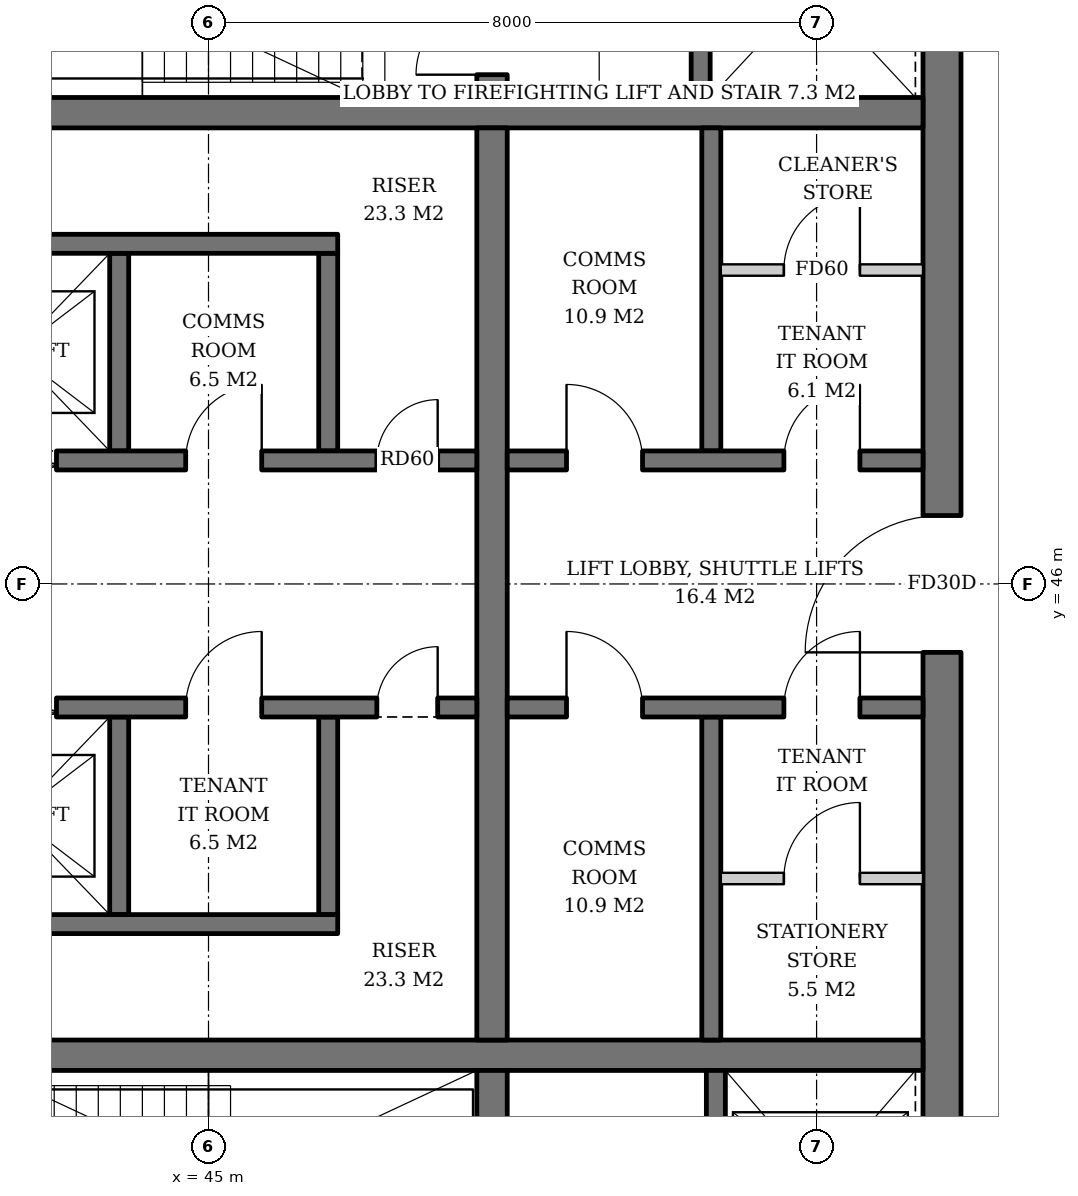
"""IFC4 building model, lengths in metres.
Left out: names, types, materials, properties, quantities, classifications, styles, units other than length and angle.
Written with IfcOpenShell. Run it as: python <this file> out.ifc"""

import sys

from ifc_helpers import new_model, si_unit, direction, frame, frame_2d, origin, place, context, subcontext, project, spatial, rectangle, extrude, element, fill, save


model = new_model("IFC4")
c1 = context("Model", 3, precision=1e-05, world=origin(), true_north=direction((0.0, 1.0)))
c2 = subcontext(c1, "Body", "Model", "MODEL_VIEW")
j1 = project(units=[si_unit("LENGTHUNIT", "METRE"), si_unit("PLANEANGLEUNIT", "RADIAN")], contexts=[c1])
p1 = place(None, origin())
s1 = spatial("IfcSite", under=j1, at=p1, CompositionType="ELEMENT")
p2 = place(p1, origin())
s2 = spatial("IfcBuilding", under=s1, at=p2, CompositionType="ELEMENT")
p3 = place(p2, frame((0.0, 0.0, 260.4)))
s3 = spatial("IfcBuildingStorey", under=s2, at=p3, CompositionType="ELEMENT", Elevation=260.4)
p4 = place(p3, frame((54.65, 36.6, 0.0), z_axis=(0.0, 0.0, 1.0), x_axis=(0.0, 1.0, 0.0)))
e1 = element("IfcWall", 1, at=p4, inside=s3, PredefinedType="SHEAR", context=c2, shape_type="SweptSolid", body=[
    extrude(rectangle(XDim=18.8, YDim=0.5, at=frame_2d((9.4, 0.0))), origin(), (0.0, 0.0, 1.0), 3.8),
])
p5 = place(p4, frame((8.5, 0.0, 0.0)))
e2 = element("IfcOpeningElement", 2, at=p5, cuts=e1, PredefinedType="OPENING", context=c2, shape_type="SweptSolid", body=[
    extrude(rectangle(XDim=1.8, YDim=2.4, at=frame_2d((0.9, 1.2))), frame((0.0, 0.26, 0.0), z_axis=(0.0, -1.0, 0.0), x_axis=(1.0, 0.0, 0.0)), (0.0, 0.0, 1.0), 0.52),
])
for number, where, z_axis, x_axis in (
    (3, (35.6, 39.8, 0.0), (0.0, 0.0, 1.0), (1.0, 0.0, 0.0)),
    (4, (35.6, 52.2, 0.0), (0.0, 0.0, 1.0), (1.0, 0.0, 0.0)),
):
    element("IfcWall", number, at=place(p3, frame(where, z_axis=z_axis, x_axis=x_axis)), inside=s3, PredefinedType="SHEAR", context=c2, shape_type="SweptSolid", body=[
        extrude(rectangle(XDim=18.8, YDim=0.4, at=frame_2d((9.4, 0.0))), origin(), (0.0, 0.0, 1.0), 3.8),
    ])
p6 = place(p3, frame((48.73, 36.6, 0.0), z_axis=(0.0, 0.0, 1.0), x_axis=(0.0, 1.0, 0.0)))
e5 = element("IfcWall", 5, at=p6, inside=s3, PredefinedType="SHEAR", context=c2, shape_type="SweptSolid", body=[
    extrude(rectangle(XDim=3.0, YDim=0.4, at=frame_2d((1.5, 0.0))), origin(), (0.0, 0.0, 1.0), 3.8),
])
p7 = place(p3, frame((48.73, 40.0, 0.0), z_axis=(0.0, 0.0, 1.0), x_axis=(0.0, 1.0, 0.0)))
e6 = element("IfcWall", 6, at=p7, inside=s3, PredefinedType="SHEAR", context=c2, shape_type="SweptSolid", body=[
    extrude(rectangle(XDim=12.0, YDim=0.4, at=frame_2d((6.0, 0.0))), origin(), (0.0, 0.0, 1.0), 3.8),
])
p8 = place(p3, frame((48.73, 52.4, 0.0), z_axis=(0.0, 0.0, 1.0), x_axis=(0.0, 1.0, 0.0)))
e7 = element("IfcWall", 7, at=p8, inside=s3, PredefinedType="SHEAR", context=c2, shape_type="SweptSolid", body=[
    extrude(rectangle(XDim=3.0, YDim=0.4, at=frame_2d((1.5, 0.0))), origin(), (0.0, 0.0, 1.0), 3.8),
])
p9 = place(p8, frame((0.3, 0.0, 0.0)))
e8 = element("IfcOpeningElement", 8, at=p9, cuts=e7, PredefinedType="OPENING", context=c2, shape_type="SweptSolid", body=[
    extrude(rectangle(XDim=1.0, YDim=2.1, at=frame_2d((0.5, 1.05))), frame((0.0, 0.21, 0.0), z_axis=(0.0, -1.0, 0.0), x_axis=(1.0, 0.0, 0.0)), (0.0, 0.0, 1.0), 0.42),
])
p10 = place(p3, frame((51.675, 36.6, 0.0), z_axis=(0.0, 0.0, 1.0), x_axis=(0.0, 1.0, 0.0)))
e9 = element("IfcWall", 9, at=p10, inside=s3, PredefinedType="SHEAR", context=c2, shape_type="SweptSolid", body=[
    extrude(rectangle(XDim=3.0, YDim=0.25, at=frame_2d((1.5, 0.0))), origin(), (0.0, 0.0, 1.0), 3.8),
])
p11 = place(p10, frame((0.85, 0.0, 0.0)))
e10 = element("IfcOpeningElement", 10, at=p11, cuts=e9, PredefinedType="OPENING", context=c2, shape_type="SweptSolid", body=[
    extrude(rectangle(XDim=1.4, YDim=2.4, at=frame_2d((0.7, 1.2))), frame((0.0, 0.135, 0.0), z_axis=(0.0, -1.0, 0.0), x_axis=(1.0, 0.0, 0.0)), (0.0, 0.0, 1.0), 0.27),
])
p12 = place(p3, frame((51.475, 52.4, 0.0), z_axis=(0.0, 0.0, 1.0), x_axis=(0.0, 1.0, 0.0)))
e11 = element("IfcWall", 11, at=p12, inside=s3, PredefinedType="SHEAR", context=c2, shape_type="SweptSolid", body=[
    extrude(rectangle(XDim=3.0, YDim=0.25, at=frame_2d((1.5, 0.0))), origin(), (0.0, 0.0, 1.0), 3.8),
])
p13 = place(p12, frame((0.8, 0.0, 0.0)))
e12 = element("IfcOpeningElement", 12, at=p13, cuts=e11, PredefinedType="OPENING", context=c2, shape_type="SweptSolid", body=[
    extrude(rectangle(XDim=1.3, YDim=2.2, at=frame_2d((0.65, 1.1))), frame((0.0, 0.135, 0.0), z_axis=(0.0, -1.0, 0.0), x_axis=(1.0, 0.0, 0.0)), (0.0, 0.0, 1.0), 0.27),
])
for number, where, z_axis, x_axis in (
    (13, (43.825, 47.75, 0.0), (0.0, 0.0, 1.0), (0.0, 1.0, 0.0)),
    (14, (46.575, 47.75, 0.0), (0.0, 0.0, 1.0), (0.0, 1.0, 0.0)),
):
    element("IfcWall", number, at=place(p3, frame(where, z_axis=z_axis, x_axis=x_axis)), inside=s3, PredefinedType="SHEAR", context=c2, shape_type="SweptSolid", body=[
        extrude(rectangle(XDim=2.6, YDim=0.25, at=frame_2d((1.3, 0.0))), origin(), (0.0, 0.0, 1.0), 3.8),
    ])
p14 = place(p3, frame((35.6, 50.475, 0.0), z_axis=(0.0, 0.0, 1.0), x_axis=(1.0, 0.0, 0.0)))
e15 = element("IfcWall", 15, at=p14, inside=s3, PredefinedType="SHEAR", context=c2, shape_type="SweptSolid", body=[
    extrude(rectangle(XDim=11.1, YDim=0.25, at=frame_2d((5.55, 0.0))), origin(), (0.0, 0.0, 1.0), 3.8),
])
p15 = place(p3, frame((35.6, 47.625, 0.0), z_axis=(0.0, 0.0, 1.0), x_axis=(1.0, 0.0, 0.0)))
e16 = element("IfcWall", 16, at=p15, inside=s3, PredefinedType="SHEAR", context=c2, shape_type="SweptSolid", body=[
    extrude(rectangle(XDim=12.93, YDim=0.25, at=frame_2d((6.465, 0.0))), origin(), (0.0, 0.0, 1.0), 3.8),
])
p16 = place(p15, frame((0.75, 0.0, 0.0)))
e17 = element("IfcOpeningElement", 17, at=p16, cuts=e16, PredefinedType="OPENING", context=c2, shape_type="SweptSolid", body=[
    extrude(rectangle(XDim=1.1, YDim=2.2, at=frame_2d((0.55, 1.1))), frame((0.0, 0.135, 0.0), z_axis=(0.0, -1.0, 0.0), x_axis=(1.0, 0.0, 0.0)), (0.0, 0.0, 1.0), 0.27),
])
p17 = place(p15, frame((3.55, 0.0, 0.0)))
e18 = element("IfcOpeningElement", 18, at=p17, cuts=e16, PredefinedType="OPENING", context=c2, shape_type="SweptSolid", body=[
    extrude(rectangle(XDim=1.1, YDim=2.2, at=frame_2d((0.55, 1.1))), frame((0.0, 0.135, 0.0), z_axis=(0.0, -1.0, 0.0), x_axis=(1.0, 0.0, 0.0)), (0.0, 0.0, 1.0), 0.27),
])
p18 = place(p15, frame((6.3, 0.0, 0.0)))
e19 = element("IfcOpeningElement", 19, at=p18, cuts=e16, PredefinedType="OPENING", context=c2, shape_type="SweptSolid", body=[
    extrude(rectangle(XDim=1.1, YDim=2.2, at=frame_2d((0.55, 1.1))), frame((0.0, 0.135, 0.0), z_axis=(0.0, -1.0, 0.0), x_axis=(1.0, 0.0, 0.0)), (0.0, 0.0, 1.0), 0.27),
])
p19 = place(p15, frame((9.1, 0.0, 0.0)))
e20 = element("IfcOpeningElement", 20, at=p19, cuts=e16, PredefinedType="OPENING", context=c2, shape_type="SweptSolid", body=[
    extrude(rectangle(XDim=1.0, YDim=2.1, at=frame_2d((0.5, 1.05))), frame((0.0, 0.135, 0.0), z_axis=(0.0, -1.0, 0.0), x_axis=(1.0, 0.0, 0.0)), (0.0, 0.0, 1.0), 0.27),
])
p20 = place(p15, frame((11.615, 0.0, 0.0)))
e21 = element("IfcOpeningElement", 21, at=p20, cuts=e16, PredefinedType="OPENING", context=c2, shape_type="SweptSolid", body=[
    extrude(rectangle(XDim=0.8, YDim=2.0, at=frame_2d((0.4, 1.0))), frame((0.0, 0.135, 0.0), z_axis=(0.0, -1.0, 0.0), x_axis=(1.0, 0.0, 0.0)), (0.0, 0.0, 1.0), 0.27),
])
for number, where, z_axis, x_axis in (
    (22, (43.825, 44.25, 0.0), (0.0, 0.0, 1.0), (0.0, -1.0, 0.0)),
    (23, (46.575, 44.25, 0.0), (0.0, 0.0, 1.0), (0.0, -1.0, 0.0)),
):
    element("IfcWall", number, at=place(p3, frame(where, z_axis=z_axis, x_axis=x_axis)), inside=s3, PredefinedType="SHEAR", context=c2, shape_type="SweptSolid", body=[
        extrude(rectangle(XDim=2.6, YDim=0.25, at=frame_2d((1.3, 0.0))), origin(), (0.0, 0.0, 1.0), 3.8),
    ])
p21 = place(p3, frame((35.6, 41.525, 0.0), z_axis=(0.0, 0.0, 1.0), x_axis=(1.0, 0.0, 0.0)))
e24 = element("IfcWall", 24, at=p21, inside=s3, PredefinedType="SHEAR", context=c2, shape_type="SweptSolid", body=[
    extrude(rectangle(XDim=11.1, YDim=0.25, at=frame_2d((5.55, 0.0))), origin(), (0.0, 0.0, 1.0), 3.8),
])
p22 = place(p3, frame((35.6, 44.375, 0.0), z_axis=(0.0, 0.0, 1.0), x_axis=(1.0, 0.0, 0.0)))
e25 = element("IfcWall", 25, at=p22, inside=s3, PredefinedType="SHEAR", context=c2, shape_type="SweptSolid", body=[
    extrude(rectangle(XDim=12.93, YDim=0.25, at=frame_2d((6.465, 0.0))), origin(), (0.0, 0.0, 1.0), 3.8),
])
p23 = place(p22, frame((0.75, 0.0, 0.0)))
e26 = element("IfcOpeningElement", 26, at=p23, cuts=e25, PredefinedType="OPENING", context=c2, shape_type="SweptSolid", body=[
    extrude(rectangle(XDim=1.1, YDim=2.2, at=frame_2d((0.55, 1.1))), frame((0.0, 0.135, 0.0), z_axis=(0.0, -1.0, 0.0), x_axis=(1.0, 0.0, 0.0)), (0.0, 0.0, 1.0), 0.27),
])
p24 = place(p22, frame((3.55, 0.0, 0.0)))
e27 = element("IfcOpeningElement", 27, at=p24, cuts=e25, PredefinedType="OPENING", context=c2, shape_type="SweptSolid", body=[
    extrude(rectangle(XDim=1.1, YDim=2.2, at=frame_2d((0.55, 1.1))), frame((0.0, 0.135, 0.0), z_axis=(0.0, -1.0, 0.0), x_axis=(1.0, 0.0, 0.0)), (0.0, 0.0, 1.0), 0.27),
])
p25 = place(p22, frame((6.3, 0.0, 0.0)))
e28 = element("IfcOpeningElement", 28, at=p25, cuts=e25, PredefinedType="OPENING", context=c2, shape_type="SweptSolid", body=[
    extrude(rectangle(XDim=1.1, YDim=2.2, at=frame_2d((0.55, 1.1))), frame((0.0, 0.135, 0.0), z_axis=(0.0, -1.0, 0.0), x_axis=(1.0, 0.0, 0.0)), (0.0, 0.0, 1.0), 0.27),
])
p26 = place(p22, frame((9.1, 0.0, 0.0)))
e29 = element("IfcOpeningElement", 29, at=p26, cuts=e25, PredefinedType="OPENING", context=c2, shape_type="SweptSolid", body=[
    extrude(rectangle(XDim=1.0, YDim=2.1, at=frame_2d((0.5, 1.05))), frame((0.0, 0.135, 0.0), z_axis=(0.0, -1.0, 0.0), x_axis=(1.0, 0.0, 0.0)), (0.0, 0.0, 1.0), 0.27),
])
p27 = place(p22, frame((11.615, 0.0, 0.0)))
e30 = element("IfcOpeningElement", 30, at=p27, cuts=e25, PredefinedType="OPENING", context=c2, shape_type="SweptSolid", body=[
    extrude(rectangle(XDim=0.8, YDim=2.0, at=frame_2d((0.4, 1.0))), frame((0.0, 0.135, 0.0), z_axis=(0.0, -1.0, 0.0), x_axis=(1.0, 0.0, 0.0)), (0.0, 0.0, 1.0), 0.27),
])
p28 = place(p3, frame((51.615, 47.75, 0.0), z_axis=(0.0, 0.0, 1.0), x_axis=(0.0, 1.0, 0.0)))
e31 = element("IfcWall", 31, at=p28, inside=s3, PredefinedType="SHEAR", context=c2, shape_type="SweptSolid", body=[
    extrude(rectangle(XDim=4.25, YDim=0.25, at=frame_2d((2.125, 0.0))), origin(), (0.0, 0.0, 1.0), 3.8),
])
p29 = place(p3, frame((48.93, 47.625, 0.0), z_axis=(0.0, 0.0, 1.0), x_axis=(1.0, 0.0, 0.0)))
e32 = element("IfcWall", 32, at=p29, inside=s3, PredefinedType="SHEAR", context=c2, shape_type="SweptSolid", body=[
    extrude(rectangle(XDim=5.47, YDim=0.25, at=frame_2d((2.735, 0.0))), origin(), (0.0, 0.0, 1.0), 3.8),
])
p30 = place(p29, frame((0.78, 0.0, 0.0)))
e33 = element("IfcOpeningElement", 33, at=p30, cuts=e32, PredefinedType="OPENING", context=c2, shape_type="SweptSolid", body=[
    extrude(rectangle(XDim=1.0, YDim=2.1, at=frame_2d((0.5, 1.05))), frame((0.0, 0.135, 0.0), z_axis=(0.0, -1.0, 0.0), x_axis=(1.0, 0.0, 0.0)), (0.0, 0.0, 1.0), 0.27),
])
p31 = place(p29, frame((3.64, 0.0, 0.0)))
e34 = element("IfcOpeningElement", 34, at=p31, cuts=e32, PredefinedType="OPENING", context=c2, shape_type="SweptSolid", body=[
    extrude(rectangle(XDim=1.0, YDim=2.1, at=frame_2d((0.5, 1.05))), frame((0.0, 0.135, 0.0), z_axis=(0.0, -1.0, 0.0), x_axis=(1.0, 0.0, 0.0)), (0.0, 0.0, 1.0), 0.27),
])
p32 = place(p3, frame((51.615, 44.25, 0.0), z_axis=(0.0, 0.0, 1.0), x_axis=(0.0, -1.0, 0.0)))
e35 = element("IfcWall", 35, at=p32, inside=s3, PredefinedType="SHEAR", context=c2, shape_type="SweptSolid", body=[
    extrude(rectangle(XDim=4.25, YDim=0.25, at=frame_2d((2.125, 0.0))), origin(), (0.0, 0.0, 1.0), 3.8),
])
p33 = place(p3, frame((48.93, 44.375, 0.0), z_axis=(0.0, 0.0, 1.0), x_axis=(1.0, 0.0, 0.0)))
e36 = element("IfcWall", 36, at=p33, inside=s3, PredefinedType="SHEAR", context=c2, shape_type="SweptSolid", body=[
    extrude(rectangle(XDim=5.47, YDim=0.25, at=frame_2d((2.735, 0.0))), origin(), (0.0, 0.0, 1.0), 3.8),
])
p34 = place(p33, frame((0.78, 0.0, 0.0)))
e37 = element("IfcOpeningElement", 37, at=p34, cuts=e36, PredefinedType="OPENING", context=c2, shape_type="SweptSolid", body=[
    extrude(rectangle(XDim=1.0, YDim=2.1, at=frame_2d((0.5, 1.05))), frame((0.0, 0.135, 0.0), z_axis=(0.0, -1.0, 0.0), x_axis=(1.0, 0.0, 0.0)), (0.0, 0.0, 1.0), 0.27),
])
p35 = place(p33, frame((3.64, 0.0, 0.0)))
e38 = element("IfcOpeningElement", 38, at=p35, cuts=e36, PredefinedType="OPENING", context=c2, shape_type="SweptSolid", body=[
    extrude(rectangle(XDim=1.0, YDim=2.1, at=frame_2d((0.5, 1.05))), frame((0.0, 0.135, 0.0), z_axis=(0.0, -1.0, 0.0), x_axis=(1.0, 0.0, 0.0)), (0.0, 0.0, 1.0), 0.27),
])
p36 = place(p3, frame((51.74, 50.13, 0.0), z_axis=(0.0, 0.0, 1.0), x_axis=(1.0, 0.0, 0.0)))
e39 = element("IfcWall", 39, at=p36, inside=s3, PredefinedType="SOLIDWALL", context=c2, shape_type="SweptSolid", body=[
    extrude(rectangle(XDim=2.66, YDim=0.15, at=frame_2d((1.33, 0.0))), origin(), (0.0, 0.0, 1.0), 3.62),
])
p37 = place(p36, frame((0.83, 0.0, 0.0)))
e40 = element("IfcOpeningElement", 40, at=p37, cuts=e39, PredefinedType="OPENING", context=c2, shape_type="SweptSolid", body=[
    extrude(rectangle(XDim=1.0, YDim=2.1, at=frame_2d((0.5, 1.05))), frame((0.0, 0.085, 0.0), z_axis=(0.0, -1.0, 0.0), x_axis=(1.0, 0.0, 0.0)), (0.0, 0.0, 1.0), 0.17),
])
p38 = place(p3, frame((51.74, 42.125, 0.0), z_axis=(0.0, 0.0, 1.0), x_axis=(1.0, 0.0, 0.0)))
e41 = element("IfcWall", 41, at=p38, inside=s3, PredefinedType="SOLIDWALL", context=c2, shape_type="SweptSolid", body=[
    extrude(rectangle(XDim=2.66, YDim=0.15, at=frame_2d((1.33, 0.0))), origin(), (0.0, 0.0, 1.0), 3.62),
])
p39 = place(p38, frame((0.83, 0.0, 0.0)))
e42 = element("IfcOpeningElement", 42, at=p39, cuts=e41, PredefinedType="OPENING", context=c2, shape_type="SweptSolid", body=[
    extrude(rectangle(XDim=1.0, YDim=2.1, at=frame_2d((0.5, 1.05))), frame((0.0, 0.085, 0.0), z_axis=(0.0, -1.0, 0.0), x_axis=(1.0, 0.0, 0.0)), (0.0, 0.0, 1.0), 0.17),
])
p40 = place(p18, origin())
e43 = element("IfcDoor", 43, at=p40, inside=s3, OperationType="DOUBLE_DOOR_SLIDING", PredefinedType="DOOR", context=c2, shape_type="SweptSolid", body=[
    extrude(rectangle(XDim=1.1, YDim=2.2, at=frame_2d((0.55, 1.1))), frame((0.0, 0.025, 0.0), z_axis=(0.0, -1.0, 0.0), x_axis=(1.0, 0.0, 0.0)), (0.0, 0.0, 1.0), 0.05),
])
fill(e19, e43)
p41 = place(p19, origin())
e44 = element("IfcDoor", 44, at=p41, inside=s3, OperationType="SINGLE_SWING_RIGHT", PredefinedType="DOOR", context=c2, shape_type="SweptSolid", body=[
    extrude(rectangle(XDim=1.0, YDim=2.1, at=frame_2d((0.5, 1.05))), frame((0.0, 0.025, 0.0), z_axis=(0.0, -1.0, 0.0), x_axis=(1.0, 0.0, 0.0)), (0.0, 0.0, 1.0), 0.05),
])
fill(e20, e44)
p42 = place(p20, origin())
e45 = element("IfcDoor", 45, at=p42, inside=s3, OperationType="SINGLE_SWING_RIGHT", PredefinedType="DOOR", context=c2, shape_type="SweptSolid", body=[
    extrude(rectangle(XDim=0.8, YDim=2.0, at=frame_2d((0.4, 1.0))), frame((0.0, 0.025, 0.0), z_axis=(0.0, -1.0, 0.0), x_axis=(1.0, 0.0, 0.0)), (0.0, 0.0, 1.0), 0.05),
])
fill(e21, e45)
p43 = place(p25, origin())
e46 = element("IfcDoor", 46, at=p43, inside=s3, OperationType="DOUBLE_DOOR_SLIDING", PredefinedType="DOOR", context=c2, shape_type="SweptSolid", body=[
    extrude(rectangle(XDim=1.1, YDim=2.2, at=frame_2d((0.55, 1.1))), frame((0.0, 0.025, 0.0), z_axis=(0.0, -1.0, 0.0), x_axis=(1.0, 0.0, 0.0)), (0.0, 0.0, 1.0), 0.05),
])
fill(e28, e46)
p44 = place(p26, origin())
e47 = element("IfcDoor", 47, at=p44, inside=s3, OperationType="SINGLE_SWING_RIGHT", PredefinedType="DOOR", context=c2, shape_type="SweptSolid", body=[
    extrude(rectangle(XDim=1.0, YDim=2.1, at=frame_2d((0.5, 1.05))), frame((0.0, 0.025, 0.0), z_axis=(0.0, -1.0, 0.0), x_axis=(1.0, 0.0, 0.0)), (0.0, 0.0, 1.0), 0.05),
])
fill(e29, e47)
p45 = place(p27, origin())
e48 = element("IfcDoor", 48, at=p45, inside=s3, OperationType="SINGLE_SWING_RIGHT", PredefinedType="DOOR", context=c2, shape_type="SweptSolid", body=[
    extrude(rectangle(XDim=0.8, YDim=2.0, at=frame_2d((0.4, 1.0))), frame((0.0, 0.025, 0.0), z_axis=(0.0, -1.0, 0.0), x_axis=(1.0, 0.0, 0.0)), (0.0, 0.0, 1.0), 0.05),
])
fill(e30, e48)
p46 = place(p30, origin())
e49 = element("IfcDoor", 49, at=p46, inside=s3, OperationType="SINGLE_SWING_LEFT", PredefinedType="DOOR", context=c2, shape_type="SweptSolid", body=[
    extrude(rectangle(XDim=1.0, YDim=2.1, at=frame_2d((0.5, 1.05))), frame((0.0, 0.025, 0.0), z_axis=(0.0, -1.0, 0.0), x_axis=(1.0, 0.0, 0.0)), (0.0, 0.0, 1.0), 0.05),
])
fill(e33, e49)
p47 = place(p31, origin())
e50 = element("IfcDoor", 50, at=p47, inside=s3, OperationType="SINGLE_SWING_RIGHT", PredefinedType="DOOR", context=c2, shape_type="SweptSolid", body=[
    extrude(rectangle(XDim=1.0, YDim=2.1, at=frame_2d((0.5, 1.05))), frame((0.0, 0.025, 0.0), z_axis=(0.0, -1.0, 0.0), x_axis=(1.0, 0.0, 0.0)), (0.0, 0.0, 1.0), 0.05),
])
fill(e34, e50)
p48 = place(p34, origin())
e51 = element("IfcDoor", 51, at=p48, inside=s3, OperationType="SINGLE_SWING_LEFT", PredefinedType="DOOR", context=c2, shape_type="SweptSolid", body=[
    extrude(rectangle(XDim=1.0, YDim=2.1, at=frame_2d((0.5, 1.05))), frame((0.0, 0.025, 0.0), z_axis=(0.0, -1.0, 0.0), x_axis=(1.0, 0.0, 0.0)), (0.0, 0.0, 1.0), 0.05),
])
fill(e37, e51)
p49 = place(p35, origin())
e52 = element("IfcDoor", 52, at=p49, inside=s3, OperationType="SINGLE_SWING_RIGHT", PredefinedType="DOOR", context=c2, shape_type="SweptSolid", body=[
    extrude(rectangle(XDim=1.0, YDim=2.1, at=frame_2d((0.5, 1.05))), frame((0.0, 0.025, 0.0), z_axis=(0.0, -1.0, 0.0), x_axis=(1.0, 0.0, 0.0)), (0.0, 0.0, 1.0), 0.05),
])
fill(e38, e52)
p50 = place(p37, origin())
e53 = element("IfcDoor", 53, at=p50, inside=s3, OperationType="SINGLE_SWING_RIGHT", PredefinedType="DOOR", context=c2, shape_type="SweptSolid", body=[
    extrude(rectangle(XDim=1.0, YDim=2.1, at=frame_2d((0.5, 1.05))), frame((0.0, 0.025, 0.0), z_axis=(0.0, -1.0, 0.0), x_axis=(1.0, 0.0, 0.0)), (0.0, 0.0, 1.0), 0.05),
])
fill(e40, e53)
p51 = place(p39, origin())
e54 = element("IfcDoor", 54, at=p51, inside=s3, OperationType="SINGLE_SWING_RIGHT", PredefinedType="DOOR", context=c2, shape_type="SweptSolid", body=[
    extrude(rectangle(XDim=1.0, YDim=2.1, at=frame_2d((0.5, 1.05))), frame((0.0, 0.025, 0.0), z_axis=(0.0, -1.0, 0.0), x_axis=(1.0, 0.0, 0.0)), (0.0, 0.0, 1.0), 0.05),
])
fill(e42, e54)
p52 = place(p9, origin())
e55 = element("IfcDoor", 55, at=p52, inside=s3, OperationType="SINGLE_SWING_LEFT", PredefinedType="DOOR", context=c2, shape_type="SweptSolid", body=[
    extrude(rectangle(XDim=1.0, YDim=2.1, at=frame_2d((0.5, 1.05))), frame((0.0, 0.025, 0.0), z_axis=(0.0, -1.0, 0.0), x_axis=(1.0, 0.0, 0.0)), (0.0, 0.0, 1.0), 0.05),
])
fill(e8, e55)
p53 = place(p5, origin())
e56 = element("IfcDoor", 56, at=p53, inside=s3, OperationType="DOUBLE_DOOR_SINGLE_SWING", PredefinedType="DOOR", context=c2, shape_type="SweptSolid", body=[
    extrude(rectangle(XDim=1.8, YDim=2.4, at=frame_2d((0.9, 1.2))), frame((0.0, 0.025, 0.0), z_axis=(0.0, -1.0, 0.0), x_axis=(1.0, 0.0, 0.0)), (0.0, 0.0, 1.0), 0.05),
])
fill(e2, e56)
save(model, sys.argv[1])
